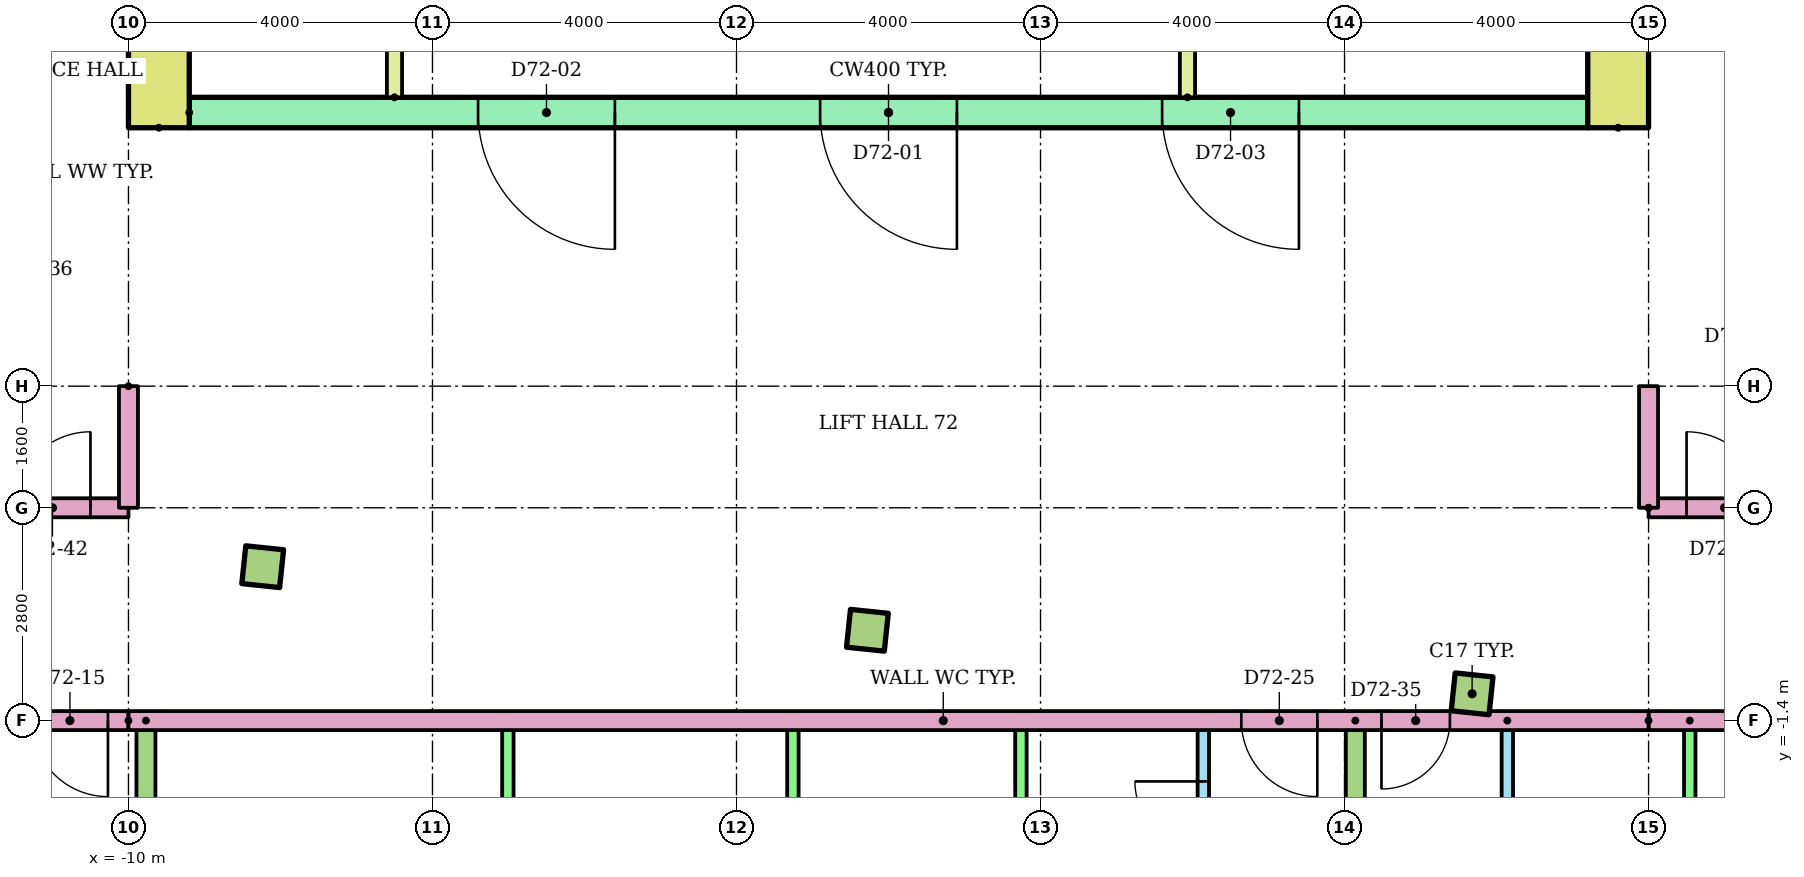
"""IFC4 building model, lengths in metres.
Left out: names, types, materials, properties, quantities, classifications, styles, units other than length and angle.
Written with IfcOpenShell. Run it as: python <this file> out.ifc"""

import sys

from ifc_helpers import new_model, si_unit, direction, frame, frame_2d, origin, origin_2d, place, context, subcontext, project, spatial, rectangle, extrude, element, fill, save


model = new_model("IFC4")
c1 = context("Model", 3, precision=1e-05, world=origin(), true_north=direction((0.0, 1.0)))
c2 = subcontext(c1, "Body", "Model", "MODEL_VIEW")
j1 = project(units=[si_unit("LENGTHUNIT", "METRE"), si_unit("PLANEANGLEUNIT", "RADIAN")], contexts=[c1])
p1 = place(None, origin())
s1 = spatial("IfcSite", under=j1, at=p1, CompositionType="ELEMENT")
p2 = place(p1, origin())
s2 = spatial("IfcBuilding", under=s1, at=p2, CompositionType="ELEMENT")
p3 = place(p2, frame((0.0, 0.0, 275.5)))
s3 = spatial("IfcBuildingStorey", under=s2, at=p3, CompositionType="ELEMENT", Elevation=275.5)
for number, where, z_axis, x_axis in (
    (1, (-8.234, 0.625, 0.0), (0.0, 0.0, 1.0), (0.995, -0.105, 0.0)),
    (2, (-0.278, -0.211, 0.0), (0.0, 0.0, 1.0), (0.995, -0.105, 0.0)),
    (3, (7.678, -1.048, 0.0), (0.0, 0.0, 1.0), (0.995, -0.105, 0.0)),
):
    element("IfcColumn", number, at=place(p3, frame(where, z_axis=z_axis, x_axis=x_axis)), inside=s3, PredefinedType="COLUMN", context=c2, shape_type="SweptSolid", body=[
        extrude(rectangle(XDim=0.5, YDim=0.5, at=origin_2d()), origin(), (0.0, 0.0, 1.0), 3.2),
    ])
for number, where, z_axis, x_axis in (
    (4, (-9.6, 6.4, 0.0), (0.0, 0.0, 1.0), (0.0, 1.0, 0.0)),
    (5, (9.6, 6.4, 0.0), (0.0, 0.0, 1.0), (0.0, 1.0, 0.0)),
):
    element("IfcWall", number, at=place(p3, frame(where, z_axis=z_axis, x_axis=x_axis)), inside=s3, PredefinedType="SHEAR", context=c2, shape_type="SweptSolid", body=[
        extrude(rectangle(XDim=13.6, YDim=0.8, at=frame_2d((6.8, 0.0))), origin(), (0.0, 0.0, 1.0), 2.92),
    ])
p4 = place(p3, frame((-9.2, 6.6, 0.0)))
e6 = element("IfcWall", 6, at=p4, inside=s3, PredefinedType="SHEAR", context=c2, shape_type="SweptSolid", body=[
    extrude(rectangle(XDim=18.4, YDim=0.4, at=frame_2d((9.2, 0.0))), origin(), (0.0, 0.0, 1.0), 2.92),
])
p5 = place(p4, frame((8.3, 0.0, 0.0)))
e7 = element("IfcOpeningElement", 7, at=p5, cuts=e6, PredefinedType="OPENING", context=c2, shape_type="SweptSolid", body=[
    extrude(rectangle(XDim=1.8, YDim=2.1, at=frame_2d((0.9, 1.05))), frame((0.0, 0.21, 0.0), z_axis=(0.0, -1.0, 0.0), x_axis=(1.0, 0.0, 0.0)), (0.0, 0.0, 1.0), 0.42),
])
p6 = place(p4, frame((3.8, 0.0, 0.0)))
e8 = element("IfcOpeningElement", 8, at=p6, cuts=e6, PredefinedType="OPENING", context=c2, shape_type="SweptSolid", body=[
    extrude(rectangle(XDim=1.8, YDim=2.1, at=frame_2d((0.9, 1.05))), frame((0.0, 0.21, 0.0), z_axis=(0.0, -1.0, 0.0), x_axis=(1.0, 0.0, 0.0)), (0.0, 0.0, 1.0), 0.42),
])
p7 = place(p4, frame((12.8, 0.0, 0.0)))
e9 = element("IfcOpeningElement", 9, at=p7, cuts=e6, PredefinedType="OPENING", context=c2, shape_type="SweptSolid", body=[
    extrude(rectangle(XDim=1.8, YDim=2.1, at=frame_2d((0.9, 1.05))), frame((0.0, 0.21, 0.0), z_axis=(0.0, -1.0, 0.0), x_axis=(1.0, 0.0, 0.0)), (0.0, 0.0, 1.0), 0.42),
])
p8 = place(p3, frame((3.933, 6.8, 0.0), z_axis=(0.0, 0.0, 1.0), x_axis=(0.0, 1.0, 0.0)))
e10 = element("IfcWall", 10, at=p8, inside=s3, PredefinedType="PARTITIONING", context=c2, shape_type="SweptSolid", body=[
    extrude(rectangle(XDim=3.3, YDim=0.2, at=frame_2d((1.65, 0.0))), origin(), (0.0, 0.0, 1.0), 2.92),
])
p9 = place(p8, frame((1.1, 0.0, 0.0)))
e11 = element("IfcOpeningElement", 11, at=p9, cuts=e10, PredefinedType="OPENING", context=c2, shape_type="SweptSolid", body=[
    extrude(rectangle(XDim=1.1, YDim=2.1, at=frame_2d((0.55, 1.05))), frame((0.0, 0.11, 0.0), z_axis=(0.0, -1.0, 0.0), x_axis=(1.0, 0.0, 0.0)), (0.0, 0.0, 1.0), 0.22),
])
p10 = place(p3, frame((-6.5, 6.8, 0.0), z_axis=(0.0, 0.0, 1.0), x_axis=(0.0, 1.0, 0.0)))
e12 = element("IfcWall", 12, at=p10, inside=s3, PredefinedType="PARTITIONING", context=c2, shape_type="SweptSolid", body=[
    extrude(rectangle(XDim=3.3, YDim=0.2, at=frame_2d((1.65, 0.0))), origin(), (0.0, 0.0, 1.0), 2.92),
])
p11 = place(p10, frame((1.15, 0.0, 0.0)))
e13 = element("IfcOpeningElement", 13, at=p11, cuts=e12, PredefinedType="OPENING", context=c2, shape_type="SweptSolid", body=[
    extrude(rectangle(XDim=1.0, YDim=2.1, at=frame_2d((0.5, 1.05))), frame((0.0, 0.11, 0.0), z_axis=(0.0, -1.0, 0.0), x_axis=(1.0, 0.0, 0.0)), (0.0, 0.0, 1.0), 0.22),
])
p12 = place(p3, frame((4.142, -5.9, 0.0), z_axis=(0.0, 0.0, 1.0), x_axis=(0.0, 1.0, 0.0)))
e14 = element("IfcWall", 14, at=p12, inside=s3, PredefinedType="PARTITIONING", context=c2, shape_type="SweptSolid", body=[
    extrude(rectangle(XDim=4.5, YDim=0.15, at=frame_2d((2.25, 0.0))), origin(), (0.0, 0.0, 1.0), 2.4),
])
p13 = place(p12, frame((2.8, 0.0, 0.0)))
e15 = element("IfcOpeningElement", 15, at=p13, cuts=e14, PredefinedType="OPENING", context=c2, shape_type="SweptSolid", body=[
    extrude(rectangle(XDim=0.9, YDim=2.1, at=frame_2d((0.45, 1.05))), frame((0.0, 0.085, 0.0), z_axis=(0.0, -1.0, 0.0), x_axis=(1.0, 0.0, 0.0)), (0.0, 0.0, 1.0), 0.17),
])
p14 = place(p12, frame((0.6, 0.0, 0.0)))
e16 = element("IfcOpeningElement", 16, at=p14, cuts=e14, PredefinedType="OPENING", context=c2, shape_type="SweptSolid", body=[
    extrude(rectangle(XDim=0.8, YDim=2.1, at=frame_2d((0.4, 1.05))), frame((0.0, 0.085, 0.0), z_axis=(0.0, -1.0, 0.0), x_axis=(1.0, 0.0, 0.0)), (0.0, 0.0, 1.0), 0.17),
])
for number, where, z_axis, x_axis in (
    (17, (1.742, -5.9, 0.0), (0.0, 0.0, 1.0), (0.0, 1.0, 0.0)),
    (18, (-1.258, -5.9, 0.0), (0.0, 0.0, 1.0), (0.0, 1.0, 0.0)),
    (19, (-5.008, -5.9, 0.0), (0.0, 0.0, 1.0), (0.0, 1.0, 0.0)),
):
    element("IfcWall", number, at=place(p3, frame(where, z_axis=z_axis, x_axis=x_axis)), inside=s3, PredefinedType="PARTITIONING", context=c2, shape_type="SweptSolid", body=[
        extrude(rectangle(XDim=4.5, YDim=0.15, at=frame_2d((2.25, 0.0))), origin(), (0.0, 0.0, 1.0), 2.4),
    ])
p15 = place(p3, frame((-9.77, -1.4, 0.0), z_axis=(0.0, 0.0, 1.0), x_axis=(0.0, -1.0, 0.0)))
e20 = element("IfcWall", 20, at=p15, inside=s3, PredefinedType="PARTITIONING", context=c2, shape_type="SweptSolid", body=[
    extrude(rectangle(XDim=12.504, YDim=0.25, at=frame_2d((6.252, 0.0))), origin(), (0.0, 0.0, 1.0), 2.4),
])
p16 = place(p3, frame((8.142, -1.4, 0.0), z_axis=(0.0, 0.0, 1.0), x_axis=(0.0, -1.0, 0.0)))
e21 = element("IfcWall", 21, at=p16, inside=s3, PredefinedType="PARTITIONING", context=c2, shape_type="SweptSolid", body=[
    extrude(rectangle(XDim=6.582, YDim=0.15, at=frame_2d((3.291, 0.0))), origin(), (0.0, 0.0, 1.0), 2.4),
])
p17 = place(p16, frame((1.3, 0.0, 0.0)))
e22 = element("IfcOpeningElement", 22, at=p17, cuts=e21, PredefinedType="OPENING", context=c2, shape_type="SweptSolid", body=[
    extrude(rectangle(XDim=0.9, YDim=2.1, at=frame_2d((0.45, 1.05))), frame((0.0, 0.085, 0.0), z_axis=(0.0, -1.0, 0.0), x_axis=(1.0, 0.0, 0.0)), (0.0, 0.0, 1.0), 0.17),
])
p18 = place(p16, frame((4.641, 0.0, 0.0)))
e23 = element("IfcOpeningElement", 23, at=p18, cuts=e21, PredefinedType="OPENING", context=c2, shape_type="SweptSolid", body=[
    extrude(rectangle(XDim=0.8, YDim=2.1, at=frame_2d((0.4, 1.05))), frame((0.0, 0.085, 0.0), z_axis=(0.0, -1.0, 0.0), x_axis=(1.0, 0.0, 0.0)), (0.0, 0.0, 1.0), 0.17),
])
p19 = place(p3, frame((10.542, -1.4, 0.0), z_axis=(0.0, 0.0, 1.0), x_axis=(0.0, -1.0, 0.0)))
e24 = element("IfcWall", 24, at=p19, inside=s3, PredefinedType="PARTITIONING", context=c2, shape_type="SweptSolid", body=[
    extrude(rectangle(XDim=6.582, YDim=0.15, at=frame_2d((3.291, 0.0))), origin(), (0.0, 0.0, 1.0), 2.4),
])
p20 = place(p3, frame((6.142, -1.4, 0.0), z_axis=(0.0, 0.0, 1.0), x_axis=(0.0, -1.0, 0.0)))
e25 = element("IfcWall", 25, at=p20, inside=s3, PredefinedType="PARTITIONING", context=c2, shape_type="SweptSolid", body=[
    extrude(rectangle(XDim=14.177, YDim=0.25, at=frame_2d((7.088, 0.0))), origin(), (0.0, 0.0, 1.0), 2.4),
])
p21 = place(p3, frame((-10.0, -1.4, 0.0), z_axis=(0.0, 0.0, 1.0), x_axis=(-1.0, 0.0, 0.0)))
e26 = element("IfcWall", 26, at=p21, inside=s3, PredefinedType="PARTITIONING", context=c2, shape_type="SweptSolid", body=[
    extrude(rectangle(XDim=13.56, YDim=0.25, at=frame_2d((6.78, 0.0))), origin(), (0.0, 0.0, 1.0), 2.4),
])
p22 = place(p21, frame((0.27, 0.0, 0.0)))
e27 = element("IfcOpeningElement", 27, at=p22, cuts=e26, PredefinedType="OPENING", context=c2, shape_type="SweptSolid", body=[
    extrude(rectangle(XDim=1.0, YDim=2.1, at=frame_2d((0.5, 1.05))), frame((0.0, 0.135, 0.0), z_axis=(0.0, -1.0, 0.0), x_axis=(1.0, 0.0, 0.0)), (0.0, 0.0, 1.0), 0.27),
])
p23 = place(p3, frame((25.0, -1.4, 0.0), z_axis=(0.0, 0.0, 1.0), x_axis=(-1.0, 0.0, 0.0)))
e28 = element("IfcWall", 28, at=p23, inside=s3, PredefinedType="PARTITIONING", context=c2, shape_type="SweptSolid", body=[
    extrude(rectangle(XDim=15.0, YDim=0.25, at=frame_2d((7.5, 0.0))), origin(), (0.0, 0.0, 1.0), 2.4),
])
p24 = place(p3, frame((-23.265, 1.4, 0.0)))
e29 = element("IfcWall", 29, at=p24, inside=s3, PredefinedType="PARTITIONING", context=c2, shape_type="SweptSolid", body=[
    extrude(rectangle(XDim=13.265, YDim=0.25, at=frame_2d((6.633, 0.0))), origin(), (0.0, 0.0, 1.0), 2.4),
])
p25 = place(p24, frame((11.765, 0.0, 0.0)))
e30 = element("IfcOpeningElement", 30, at=p25, cuts=e29, PredefinedType="OPENING", context=c2, shape_type="SweptSolid", body=[
    extrude(rectangle(XDim=1.0, YDim=2.1, at=frame_2d((0.5, 1.05))), frame((0.0, 0.135, 0.0), z_axis=(0.0, -1.0, 0.0), x_axis=(1.0, 0.0, 0.0)), (0.0, 0.0, 1.0), 0.27),
])
p26 = place(p3, frame((10.0, 1.4, 0.0)))
e31 = element("IfcWall", 31, at=p26, inside=s3, PredefinedType="PARTITIONING", context=c2, shape_type="SweptSolid", body=[
    extrude(rectangle(XDim=15.0, YDim=0.25, at=frame_2d((7.5, 0.0))), origin(), (0.0, 0.0, 1.0), 2.4),
])
p27 = place(p26, frame((0.5, 0.0, 0.0)))
e32 = element("IfcOpeningElement", 32, at=p27, cuts=e31, PredefinedType="OPENING", context=c2, shape_type="SweptSolid", body=[
    extrude(rectangle(XDim=1.0, YDim=2.1, at=frame_2d((0.5, 1.05))), frame((0.0, 0.135, 0.0), z_axis=(0.0, -1.0, 0.0), x_axis=(1.0, 0.0, 0.0)), (0.0, 0.0, 1.0), 0.27),
])
p28 = place(p3, frame((10.0, -1.4, 0.0), z_axis=(0.0, 0.0, 1.0), x_axis=(-1.0, 0.0, 0.0)))
e33 = element("IfcWall", 33, at=p28, inside=s3, PredefinedType="PARTITIONING", context=c2, shape_type="SweptSolid", body=[
    extrude(rectangle(XDim=20.0, YDim=0.25, at=frame_2d((10.0, 0.0))), origin(), (0.0, 0.0, 1.0), 2.4),
])
p29 = place(p28, frame((4.358, 0.0, 0.0)))
e34 = element("IfcOpeningElement", 34, at=p29, cuts=e33, PredefinedType="OPENING", context=c2, shape_type="SweptSolid", body=[
    extrude(rectangle(XDim=1.0, YDim=2.1, at=frame_2d((0.5, 1.05))), frame((0.0, 0.135, 0.0), z_axis=(0.0, -1.0, 0.0), x_axis=(1.0, 0.0, 0.0)), (0.0, 0.0, 1.0), 0.27),
])
p30 = place(p28, frame((2.614, 0.0, 0.0)))
e35 = element("IfcOpeningElement", 35, at=p30, cuts=e33, PredefinedType="OPENING", context=c2, shape_type="SweptSolid", body=[
    extrude(rectangle(XDim=0.9, YDim=2.1, at=frame_2d((0.45, 1.05))), frame((0.0, 0.135, 0.0), z_axis=(0.0, -1.0, 0.0), x_axis=(1.0, 0.0, 0.0)), (0.0, 0.0, 1.0), 0.27),
])
for number, where, z_axis, x_axis in (
    (36, (-10.0, 3.0, 0.0), (0.0, 0.0, 1.0), (0.0, -1.0, 0.0)),
    (37, (10.0, 1.4, 0.0), (0.0, 0.0, 1.0), (0.0, 1.0, 0.0)),
):
    element("IfcWall", number, at=place(p3, frame(where, z_axis=z_axis, x_axis=x_axis)), inside=s3, PredefinedType="PARTITIONING", context=c2, shape_type="SweptSolid", body=[
        extrude(rectangle(XDim=1.6, YDim=0.25, at=frame_2d((0.8, 0.0))), origin(), (0.0, 0.0, 1.0), 2.4),
    ])
p31 = place(p5, frame((1.8, 0.0, 0.0), z_axis=(0.0, 0.0, 1.0), x_axis=(-1.0, 0.0, 0.0)))
e38 = element("IfcDoor", 38, at=p31, inside=s3, OperationType="DOUBLE_DOOR_SINGLE_SWING", PredefinedType="DOOR", context=c2, shape_type="SweptSolid", body=[
    extrude(rectangle(XDim=1.8, YDim=2.1, at=frame_2d((0.9, 1.05))), frame((0.0, 0.025, 0.0), z_axis=(0.0, -1.0, 0.0), x_axis=(1.0, 0.0, 0.0)), (0.0, 0.0, 1.0), 0.05),
])
fill(e7, e38)
p32 = place(p6, frame((1.8, 0.0, 0.0), z_axis=(0.0, 0.0, 1.0), x_axis=(-1.0, 0.0, 0.0)))
e39 = element("IfcDoor", 39, at=p32, inside=s3, OperationType="DOUBLE_DOOR_SINGLE_SWING", PredefinedType="DOOR", context=c2, shape_type="SweptSolid", body=[
    extrude(rectangle(XDim=1.8, YDim=2.1, at=frame_2d((0.9, 1.05))), frame((0.0, 0.025, 0.0), z_axis=(0.0, -1.0, 0.0), x_axis=(1.0, 0.0, 0.0)), (0.0, 0.0, 1.0), 0.05),
])
fill(e8, e39)
p33 = place(p7, frame((1.8, 0.0, 0.0), z_axis=(0.0, 0.0, 1.0), x_axis=(-1.0, 0.0, 0.0)))
e40 = element("IfcDoor", 40, at=p33, inside=s3, OperationType="DOUBLE_DOOR_SINGLE_SWING", PredefinedType="DOOR", context=c2, shape_type="SweptSolid", body=[
    extrude(rectangle(XDim=1.8, YDim=2.1, at=frame_2d((0.9, 1.05))), frame((0.0, 0.025, 0.0), z_axis=(0.0, -1.0, 0.0), x_axis=(1.0, 0.0, 0.0)), (0.0, 0.0, 1.0), 0.05),
])
fill(e9, e40)
p34 = place(p22, origin())
e41 = element("IfcDoor", 41, at=p34, inside=s3, OperationType="SINGLE_SWING_LEFT", PredefinedType="DOOR", context=c2, shape_type="SweptSolid", body=[
    extrude(rectangle(XDim=1.0, YDim=2.1, at=frame_2d((0.5, 1.05))), frame((0.0, 0.025, 0.0), z_axis=(0.0, -1.0, 0.0), x_axis=(1.0, 0.0, 0.0)), (0.0, 0.0, 1.0), 0.05),
])
fill(e27, e41)
p35 = place(p13, origin())
e42 = element("IfcDoor", 42, at=p35, inside=s3, OperationType="SINGLE_SWING_RIGHT", PredefinedType="DOOR", context=c2, shape_type="SweptSolid", body=[
    extrude(rectangle(XDim=0.9, YDim=2.1, at=frame_2d((0.45, 1.05))), frame((0.0, 0.025, 0.0), z_axis=(0.0, -1.0, 0.0), x_axis=(1.0, 0.0, 0.0)), (0.0, 0.0, 1.0), 0.05),
])
fill(e15, e42)
p36 = place(p29, origin())
e43 = element("IfcDoor", 43, at=p36, inside=s3, OperationType="SINGLE_SWING_LEFT", PredefinedType="DOOR", context=c2, shape_type="SweptSolid", body=[
    extrude(rectangle(XDim=1.0, YDim=2.1, at=frame_2d((0.5, 1.05))), frame((0.0, 0.025, 0.0), z_axis=(0.0, -1.0, 0.0), x_axis=(1.0, 0.0, 0.0)), (0.0, 0.0, 1.0), 0.05),
])
fill(e34, e43)
p37 = place(p30, origin())
e44 = element("IfcDoor", 44, at=p37, inside=s3, OperationType="SINGLE_SWING_RIGHT", PredefinedType="DOOR", context=c2, shape_type="SweptSolid", body=[
    extrude(rectangle(XDim=0.9, YDim=2.1, at=frame_2d((0.45, 1.05))), frame((0.0, 0.025, 0.0), z_axis=(0.0, -1.0, 0.0), x_axis=(1.0, 0.0, 0.0)), (0.0, 0.0, 1.0), 0.05),
])
fill(e35, e44)
p38 = place(p25, origin())
e45 = element("IfcDoor", 45, at=p38, inside=s3, OperationType="SINGLE_SWING_RIGHT", PredefinedType="DOOR", context=c2, shape_type="SweptSolid", body=[
    extrude(rectangle(XDim=1.0, YDim=2.1, at=frame_2d((0.5, 1.05))), frame((0.0, 0.025, 0.0), z_axis=(0.0, -1.0, 0.0), x_axis=(1.0, 0.0, 0.0)), (0.0, 0.0, 1.0), 0.05),
])
fill(e30, e45)
p39 = place(p27, origin())
e46 = element("IfcDoor", 46, at=p39, inside=s3, OperationType="SINGLE_SWING_LEFT", PredefinedType="DOOR", context=c2, shape_type="SweptSolid", body=[
    extrude(rectangle(XDim=1.0, YDim=2.1, at=frame_2d((0.5, 1.05))), frame((0.0, 0.025, 0.0), z_axis=(0.0, -1.0, 0.0), x_axis=(1.0, 0.0, 0.0)), (0.0, 0.0, 1.0), 0.05),
])
fill(e32, e46)
save(model, sys.argv[1])
